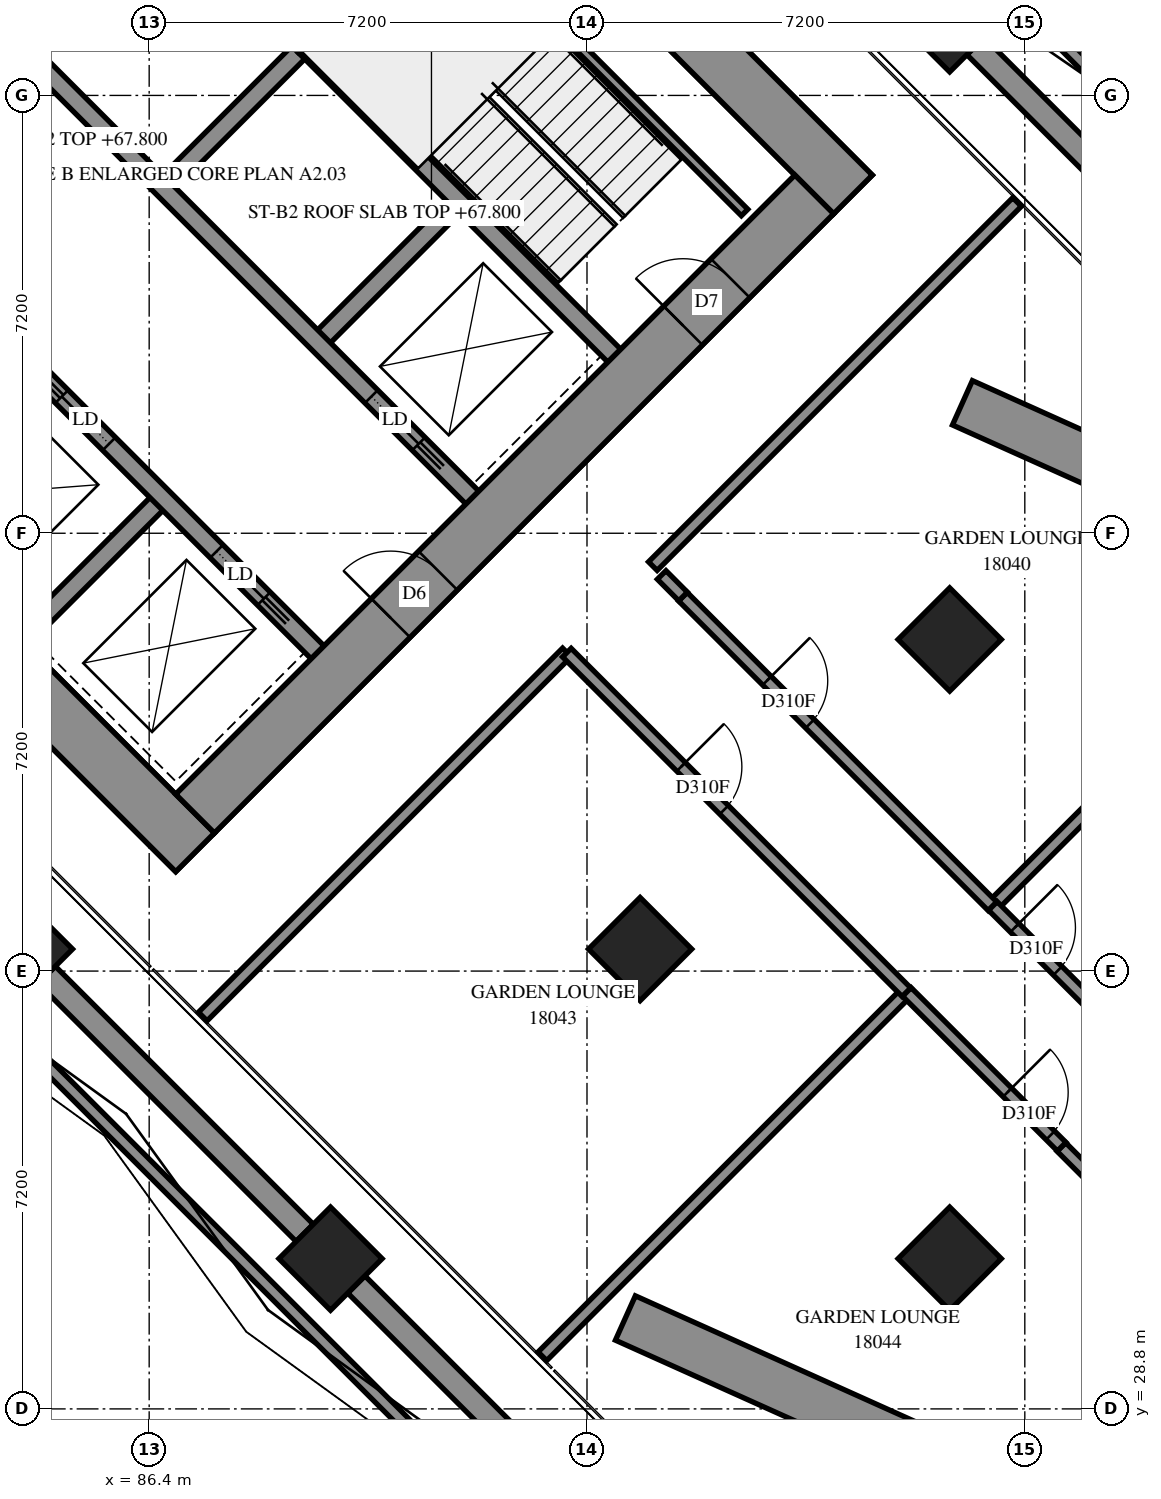
"""IFC4 building model, lengths in metres.
Left out: names, types, materials, properties, quantities, classifications, styles, units other than length and angle.
Written with IfcOpenShell. Run it as: python <this file> out.ifc"""

import sys

from ifc_helpers import new_model, si_unit, direction, frame, frame_2d, origin, origin_2d, place, context, subcontext, project, spatial, polyline, rectangle, outline, extrude, element, fill, save


model = new_model("IFC4")
c1 = context("Model", 3, precision=1e-05, world=origin(), true_north=direction((0.0, 1.0)))
c2 = subcontext(c1, "Body", "Model", "MODEL_VIEW")
j1 = project(units=[si_unit("LENGTHUNIT", "METRE"), si_unit("PLANEANGLEUNIT", "RADIAN")], contexts=[c1])
p1 = place(None, origin())
s1 = spatial("IfcSite", under=j1, at=p1, CompositionType="ELEMENT")
p2 = place(p1, origin())
s2 = spatial("IfcBuilding", under=s1, at=p2, CompositionType="ELEMENT")
p3 = place(p2, frame((0.0, 0.0, 67.8)))
s3 = spatial("IfcBuildingStorey", under=s2, at=p3, CompositionType="ELEMENT", Elevation=67.8)
for number, where, z_axis, x_axis in (
    (1, (99.565, 51.635, 0.0), (0.0, 0.0, 1.0), (0.707, -0.707, 0.0)),
    (2, (84.291, 36.362, 0.0), (0.0, 0.0, 1.0), (0.707, -0.707, 0.0)),
    (3, (99.565, 41.453, 0.0), (0.0, 0.0, 1.0), (0.707, -0.707, 0.0)),
    (4, (94.474, 36.362, 0.0), (0.0, 0.0, 1.0), (0.707, -0.707, 0.0)),
    (5, (89.382, 31.271, 0.0), (0.0, 0.0, 1.0), (0.707, -0.707, 0.0)),
    (6, (99.565, 31.271, 0.0), (0.0, 0.0, 1.0), (0.707, -0.707, 0.0)),
):
    element("IfcColumn", number, at=place(p3, frame(where, z_axis=z_axis, x_axis=x_axis)), inside=s3, PredefinedType="COLUMN", context=c2, shape_type="SweptSolid", body=[
        extrude(rectangle(XDim=1.2, YDim=1.2, at=origin_2d()), origin(), (0.0, 0.0, 1.0), 3.9),
    ])
p4 = place(p3, frame((75.7, 49.408, -0.3), z_axis=(0.0, 0.0, 1.0), x_axis=(0.7071098676, -0.7071036948, 0.0)))
e7 = element("IfcWall", 7, at=p4, inside=s3, PredefinedType="SHEAR", context=c2, shape_type="SweptSolid", body=[
    extrude(rectangle(XDim=16.2, YDim=0.9, at=frame_2d((8.1, 0.0))), origin(), (0.0, 0.0, 1.0), 3.5),
])
p5 = place(p3, frame((86.519, 60.227, -0.3), z_axis=(0.0, 0.0, 1.0), x_axis=(0.7071036948, -0.7071098676, 0.0)))
e8 = element("IfcWall", 8, at=p5, inside=s3, PredefinedType="SHEAR", context=c2, shape_type="SweptSolid", body=[
    extrude(rectangle(XDim=16.2, YDim=0.9, at=frame_2d((8.1, 0.0))), origin(), (0.0, 0.0, 1.0), 3.5),
])
p6 = place(p5, frame((10.9, 0.0, 0.3)))
e9 = element("IfcOpeningElement", 9, at=p6, cuts=e8, PredefinedType="OPENING", context=c2, shape_type="SweptSolid", body=[
    extrude(rectangle(XDim=0.8, YDim=2.1, at=frame_2d((0.4, 1.05))), frame((0.0, 0.46, 0.0), z_axis=(0.0, -1.0, 0.0), x_axis=(1.0, 0.0, 0.0)), (0.0, 0.0, 1.0), 0.92),
])
p7 = place(p3, frame((76.336, 49.408, -0.3), z_axis=(0.0, 0.0, 1.0), x_axis=(0.7071067812, 0.7071067812, 0.0)))
e10 = element("IfcWall", 10, at=p7, inside=s3, PredefinedType="SHEAR", context=c2, shape_type="SweptSolid", body=[
    extrude(rectangle(XDim=14.4, YDim=0.9, at=frame_2d((7.2, 0.0))), origin(), (0.0, 0.0, 1.0), 3.5),
])
p8 = place(p7, frame((4.55, 0.0, 0.3)))
e11 = element("IfcOpeningElement", 11, at=p8, cuts=e10, PredefinedType="OPENING", context=c2, shape_type="SweptSolid", body=[
    extrude(rectangle(XDim=1.1, YDim=2.1, at=frame_2d((0.55, 1.05))), frame((0.0, 0.46, 0.0), z_axis=(0.0, -1.0, 0.0), x_axis=(1.0, 0.0, 0.0)), (0.0, 0.0, 1.0), 0.92),
])
p9 = place(p7, frame((11.35, 0.0, 0.3)))
e12 = element("IfcOpeningElement", 12, at=p9, cuts=e10, PredefinedType="OPENING", context=c2, shape_type="SweptSolid", body=[
    extrude(rectangle(XDim=1.1, YDim=2.1, at=frame_2d((0.55, 1.05))), frame((0.0, 0.46, 0.0), z_axis=(0.0, -1.0, 0.0), x_axis=(1.0, 0.0, 0.0)), (0.0, 0.0, 1.0), 0.92),
])
p10 = place(p3, frame((87.155, 38.589, -0.3), z_axis=(0.0, 0.0, 1.0), x_axis=(0.7071067812, 0.7071067812, 0.0)))
e13 = element("IfcWall", 13, at=p10, inside=s3, PredefinedType="SHEAR", context=c2, shape_type="SweptSolid", body=[
    extrude(rectangle(XDim=14.4, YDim=0.9, at=frame_2d((7.2, 0.0))), origin(), (0.0, 0.0, 1.0), 3.5),
])
p11 = place(p10, frame((4.55, 0.0, 0.3)))
e14 = element("IfcOpeningElement", 14, at=p11, cuts=e13, PredefinedType="OPENING", context=c2, shape_type="SweptSolid", body=[
    extrude(rectangle(XDim=1.1, YDim=2.1, at=frame_2d((0.55, 1.05))), frame((0.0, 0.46, 0.0), z_axis=(0.0, -1.0, 0.0), x_axis=(1.0, 0.0, 0.0)), (0.0, 0.0, 1.0), 0.92),
])
p12 = place(p10, frame((11.35, 0.0, 0.3)))
e15 = element("IfcOpeningElement", 15, at=p12, cuts=e13, PredefinedType="OPENING", context=c2, shape_type="SweptSolid", body=[
    extrude(rectangle(XDim=1.1, YDim=2.1, at=frame_2d((0.55, 1.05))), frame((0.0, 0.46, 0.0), z_axis=(0.0, -1.0, 0.0), x_axis=(1.0, 0.0, 0.0)), (0.0, 0.0, 1.0), 0.92),
])
p13 = place(p3, frame((86.625, 48.878, 0.0), z_axis=(0.0, 0.0, 1.0), x_axis=(0.7071067812, 0.7071067812, 0.0)))
e16 = element("IfcWall", 16, at=p13, inside=s3, PredefinedType="SOLIDWALL", context=c2, shape_type="SweptSolid", body=[
    extrude(rectangle(XDim=3.3, YDim=0.3, at=frame_2d((1.65, 0.0))), origin(), (0.0, 0.0, 1.0), 3.9),
])
p14 = place(p3, frame((84.291, 41.453, 0.0), z_axis=(0.0, 0.0, 1.0), x_axis=(0.7071067812, 0.7071067812, 0.0)))
e17 = element("IfcWall", 17, at=p14, inside=s3, PredefinedType="SOLIDWALL", context=c2, shape_type="SweptSolid", body=[
    extrude(rectangle(XDim=3.3, YDim=0.3, at=frame_2d((1.65, 0.0))), origin(), (0.0, 0.0, 1.0), 3.9),
])
p15 = place(p3, frame((89.17, 46.332, 0.0), z_axis=(0.0, 0.0, 1.0), x_axis=(0.7071067812, 0.7071067812, 0.0)))
e18 = element("IfcWall", 18, at=p15, inside=s3, PredefinedType="SOLIDWALL", context=c2, shape_type="SweptSolid", body=[
    extrude(rectangle(XDim=3.3, YDim=0.3, at=frame_2d((1.65, 0.0))), origin(), (0.0, 0.0, 1.0), 3.9),
])
p16 = place(p3, frame((78.988, 51.423, 0.0), z_axis=(0.0, 0.0, 1.0), x_axis=(0.7071067812, -0.7071067812, 0.0)))
e19 = element("IfcWall", 19, at=p16, inside=s3, PredefinedType="SOLIDWALL", context=c2, shape_type="SweptSolid", body=[
    extrude(rectangle(XDim=14.4, YDim=0.3, at=frame_2d((7.2, 0.0))), origin(), (0.0, 0.0, 1.0), 3.9),
])
p17 = place(p16, frame((1.25, 0.0, 0.0)))
e20 = element("IfcOpeningElement", 20, at=p17, cuts=e19, PredefinedType="OPENING", context=c2, shape_type="SweptSolid", body=[
    extrude(rectangle(XDim=1.1, YDim=2.1, at=frame_2d((0.55, 1.05))), frame((0.0, 0.16, 0.0), z_axis=(0.0, -1.0, 0.0), x_axis=(1.0, 0.0, 0.0)), (0.0, 0.0, 1.0), 0.32),
])
p18 = place(p16, frame((4.85, 0.0, 0.0)))
e21 = element("IfcOpeningElement", 21, at=p18, cuts=e19, PredefinedType="OPENING", context=c2, shape_type="SweptSolid", body=[
    extrude(rectangle(XDim=1.1, YDim=2.1, at=frame_2d((0.55, 1.05))), frame((0.0, 0.16, 0.0), z_axis=(0.0, -1.0, 0.0), x_axis=(1.0, 0.0, 0.0)), (0.0, 0.0, 1.0), 0.32),
])
p19 = place(p16, frame((8.45, 0.0, 0.0)))
e22 = element("IfcOpeningElement", 22, at=p19, cuts=e19, PredefinedType="OPENING", context=c2, shape_type="SweptSolid", body=[
    extrude(rectangle(XDim=1.1, YDim=2.1, at=frame_2d((0.55, 1.05))), frame((0.0, 0.16, 0.0), z_axis=(0.0, -1.0, 0.0), x_axis=(1.0, 0.0, 0.0)), (0.0, 0.0, 1.0), 0.32),
])
p20 = place(p16, frame((12.05, 0.0, 0.0)))
e23 = element("IfcOpeningElement", 23, at=p20, cuts=e19, PredefinedType="OPENING", context=c2, shape_type="SweptSolid", body=[
    extrude(rectangle(XDim=1.1, YDim=2.1, at=frame_2d((0.55, 1.05))), frame((0.0, 0.16, 0.0), z_axis=(0.0, -1.0, 0.0), x_axis=(1.0, 0.0, 0.0)), (0.0, 0.0, 1.0), 0.32),
])
p21 = place(p3, frame((81.534, 53.969, 0.0), z_axis=(0.0, 0.0, 1.0), x_axis=(0.707103309, -0.7071102534, 0.0)))
e24 = element("IfcWall", 24, at=p21, inside=s3, PredefinedType="SOLIDWALL", context=c2, shape_type="SweptSolid", body=[
    extrude(rectangle(XDim=14.4, YDim=0.3, at=frame_2d((7.2, 0.0))), origin(), (0.0, 0.0, 1.0), 3.9),
])
p22 = place(p21, frame((12.05, 0.0, 0.0)))
e25 = element("IfcOpeningElement", 25, at=p22, cuts=e24, PredefinedType="OPENING", context=c2, shape_type="SweptSolid", body=[
    extrude(rectangle(XDim=1.1, YDim=2.1, at=frame_2d((0.55, 1.05))), frame((0.0, 0.16, 0.0), z_axis=(0.0, -1.0, 0.0), x_axis=(1.0, 0.0, 0.0)), (0.0, 0.0, 1.0), 0.32),
])
for number, where, z_axis, x_axis in (
    (26, (83.867, 56.302, 0.0), (0.0, 0.0, 1.0), (0.707, -0.707, 0.0)),
    (27, (88.958, 51.211, 0.0), (0.0, 0.0, 1.0), (0.707, -0.707, 0.0)),
):
    element("IfcWall", number, at=place(p3, frame(where, z_axis=z_axis, x_axis=x_axis)), inside=s3, PredefinedType="SOLIDWALL", context=c2, shape_type="SweptSolid", body=[
        extrude(rectangle(XDim=7.2, YDim=0.3, at=frame_2d((3.6, 0.0))), origin(), (0.0, 0.0, 1.0), 3.9),
    ])
p23 = place(p3, frame((88.958, 51.211, 0.0), z_axis=(0.0, 0.0, 1.0), x_axis=(0.7071067812, 0.7071067812, 0.0)))
e28 = element("IfcWall", 28, at=p23, inside=s3, PredefinedType="SOLIDWALL", context=c2, shape_type="SweptSolid", body=[
    extrude(rectangle(XDim=4.2, YDim=0.3, at=frame_2d((2.1, 0.0))), origin(), (0.0, 0.0, 1.0), 3.9),
])
p24 = place(p3, frame((105.319, 42.853, 0.0), z_axis=(0.0, 0.0, 1.0), x_axis=(-0.9121070138, 0.4099521866, 0.0)))
e29 = element("IfcWall", 29, at=p24, inside=s3, PredefinedType="SOLIDWALL", context=c2, shape_type="SweptSolid", body=[
    extrude(rectangle(XDim=6.079, YDim=0.8, at=frame_2d((3.039, 0.0))), origin(), (0.0, 0.0, 1.0), 0.65),
])
p25 = place(p3, frame((100.242, 27.593, 0.0), z_axis=(0.0, 0.0, 1.0), x_axis=(-0.9121025807, 0.4099620498, 0.0)))
e30 = element("IfcWall", 30, at=p25, inside=s3, PredefinedType="SOLIDWALL", context=c2, shape_type="SweptSolid", body=[
    extrude(rectangle(XDim=6.589, YDim=0.8, at=frame_2d((3.295, 0.0))), origin(), (0.0, 0.0, 1.0), 0.65),
])
p26 = place(p3, frame((112.929, 39.756, 0.0), z_axis=(0.0, 0.0, 1.0), x_axis=(-0.7071067812, 0.7071067812, 0.0)))
e31 = element("IfcWall", 31, at=p26, inside=s3, PredefinedType="SOLIDWALL", context=c2, shape_type="SweptSolid", body=[
    extrude(outline(polyline([(-0.1, -0.1), (47.126, -0.1), (47.044, 0.1), (0.1, 0.1), (-0.1, -0.1)])), origin(), (0.0, 0.0, 1.0), 4.2),
])
p27 = place(p3, frame((77.018, 42.15, 0.0), z_axis=(0.0, 0.0, 1.0), x_axis=(0.7071067812, -0.7071067812, 0.0)))
e32 = element("IfcWall", 32, at=p27, inside=s3, PredefinedType="SOLIDWALL", context=c2, shape_type="SweptSolid", body=[
    extrude(outline(polyline([(0.041, -0.1), (31.986, -0.1), (31.786, 0.1), (-0.041, 0.1), (0.041, -0.1)])), origin(), (0.0, 0.0, 1.0), 4.2),
])
p28 = place(p3, frame((99.565, 19.603, 0.0), z_axis=(0.0, 0.0, 1.0), x_axis=(0.7071067812, 0.7071067812, 0.0)))
e33 = element("IfcWall", 33, at=p28, inside=s3, PredefinedType="SOLIDWALL", context=c2, shape_type="SweptSolid", body=[
    extrude(outline(polyline([(-0.1, -0.1), (19.0, -0.1), (18.8, 0.1), (0.1, 0.1), (-0.1, -0.1)])), origin(), (0.0, 0.0, 1.0), 4.2),
])
p29 = place(p3, frame((91.313, 53.354, 0.0), z_axis=(0.0, 0.0, 1.0), x_axis=(0.7071140275, -0.7070995348, 0.0)))
e34 = element("IfcWall", 34, at=p29, inside=s3, PredefinedType="PARTITIONING", context=c2, shape_type="SweptSolid", body=[
    extrude(rectangle(XDim=6.9, YDim=0.15, at=frame_2d((3.45, 0.0))), origin(), (0.0, 0.0, 1.0), 3.9),
])
for number, where, z_axis, x_axis in (
    (35, (100.271, 37.069, 0.0), (0.0, 0.0, 1.0), (0.707, 0.707, 0.0)),
    (36, (92.867, 29.665, 0.0), (0.0, 0.0, 1.0), (0.707, 0.707, 0.0)),
    (37, (97.958, 24.574, 0.0), (0.0, 0.0, 1.0), (0.707, 0.707, 0.0)),
):
    element("IfcWall", number, at=place(p3, frame(where, z_axis=z_axis, x_axis=x_axis)), inside=s3, PredefinedType="PARTITIONING", context=c2, shape_type="SweptSolid", body=[
        extrude(rectangle(XDim=8.471, YDim=0.2, at=frame_2d((4.236, 0.0))), origin(), (0.0, 0.0, 1.0), 3.9),
    ])
p30 = place(p3, frame((94.683, 42.659, 0.0), z_axis=(0.0, 0.0, 1.0), x_axis=(0.7072248389, 0.7069887037, 0.0)))
e38 = element("IfcWall", 38, at=p30, inside=s3, PredefinedType="PARTITIONING", context=c2, shape_type="SweptSolid", body=[
    extrude(rectangle(XDim=8.47, YDim=0.2, at=frame_2d((4.235, 0.0))), origin(), (0.0, 0.0, 1.0), 3.9),
])
p31 = place(p3, frame((87.281, 35.252, 0.0), z_axis=(0.0, 0.0, 1.0), x_axis=(0.7071067812, 0.7071067812, 0.0)))
e39 = element("IfcWall", 39, at=p31, inside=s3, PredefinedType="PARTITIONING", context=c2, shape_type="SweptSolid", body=[
    extrude(rectangle(XDim=8.468, YDim=0.2, at=frame_2d((4.234, 0.0))), origin(), (0.0, 0.0, 1.0), 3.9),
])
p32 = place(p3, frame((93.269, 41.237, 0.0), z_axis=(0.0, 0.0, 1.0), x_axis=(0.7071067812, -0.7071067812, 0.0)))
e40 = element("IfcWall", 40, at=p32, inside=s3, PredefinedType="PARTITIONING", context=c2, shape_type="SweptSolid", body=[
    extrude(rectangle(XDim=7.9, YDim=0.2, at=frame_2d((3.95, 0.0))), origin(), (0.0, 0.0, 1.0), 3.9),
])
p33 = place(p32, frame((2.656, 0.0, 0.0)))
e41 = element("IfcOpeningElement", 41, at=p33, cuts=e40, PredefinedType="OPENING", context=c2, shape_type="SweptSolid", body=[
    extrude(rectangle(XDim=1.0, YDim=2.1, at=frame_2d((0.5, 1.05))), frame((0.0, 0.11, 0.0), z_axis=(0.0, -1.0, 0.0), x_axis=(1.0, 0.0, 0.0)), (0.0, 0.0, 1.0), 0.22),
])
p34 = place(p3, frame((95.177, 42.157, 0.0), z_axis=(0.0, 0.0, 1.0), x_axis=(0.7071067812, -0.7071067812, 0.0)))
e42 = element("IfcWall", 42, at=p34, inside=s3, PredefinedType="PARTITIONING", context=c2, shape_type="SweptSolid", body=[
    extrude(rectangle(XDim=7.201, YDim=0.2, at=frame_2d((3.601, 0.0))), origin(), (0.0, 0.0, 1.0), 3.9),
])
p35 = place(p34, frame((1.954, 0.0, 0.0)))
e43 = element("IfcOpeningElement", 43, at=p35, cuts=e42, PredefinedType="OPENING", context=c2, shape_type="SweptSolid", body=[
    extrude(rectangle(XDim=1.0, YDim=2.1, at=frame_2d((0.5, 1.05))), frame((0.0, 0.11, 0.0), z_axis=(0.0, -1.0, 0.0), x_axis=(1.0, 0.0, 0.0)), (0.0, 0.0, 1.0), 0.22),
])
p36 = place(p3, frame((105.551, 28.955, 0.0), z_axis=(0.0, 0.0, 1.0), x_axis=(-0.7068512158, 0.7073622542, 0.0)))
e44 = element("IfcWall", 44, at=p36, inside=s3, PredefinedType="PARTITIONING", context=c2, shape_type="SweptSolid", body=[
    extrude(rectangle(XDim=5.87, YDim=0.2, at=frame_2d((2.935, 0.0))), origin(), (0.0, 0.0, 1.0), 3.9),
])
p37 = place(p36, frame((1.168, 0.0, 0.0)))
e45 = element("IfcOpeningElement", 45, at=p37, cuts=e44, PredefinedType="OPENING", context=c2, shape_type="SweptSolid", body=[
    extrude(rectangle(XDim=1.0, YDim=2.1, at=frame_2d((0.5, 1.05))), frame((0.0, 0.11, 0.0), z_axis=(0.0, -1.0, 0.0), x_axis=(1.0, 0.0, 0.0)), (0.0, 0.0, 1.0), 0.22),
])
p38 = place(p3, frame((98.86, 35.656, 0.0), z_axis=(0.0, 0.0, 1.0), x_axis=(0.7073845681, -0.7068288851, 0.0)))
e46 = element("IfcWall", 46, at=p38, inside=s3, PredefinedType="PARTITIONING", context=c2, shape_type="SweptSolid", body=[
    extrude(rectangle(XDim=3.599, YDim=0.2, at=frame_2d((1.8, 0.0))), origin(), (0.0, 0.0, 1.0), 3.9),
])
p39 = place(p38, frame((2.337, 0.0, 0.0)))
e47 = element("IfcOpeningElement", 47, at=p39, cuts=e46, PredefinedType="OPENING", context=c2, shape_type="SweptSolid", body=[
    extrude(rectangle(XDim=1.0, YDim=2.1, at=frame_2d((0.5, 1.05))), frame((0.0, 0.11, 0.0), z_axis=(0.0, -1.0, 0.0), x_axis=(1.0, 0.0, 0.0)), (0.0, 0.0, 1.0), 0.22),
])
p40 = place(p3, frame((100.275, 37.071, 0.0), z_axis=(0.0, 0.0, 1.0), x_axis=(0.7073845681, -0.7068288851, 0.0)))
e48 = element("IfcWall", 48, at=p40, inside=s3, PredefinedType="PARTITIONING", context=c2, shape_type="SweptSolid", body=[
    extrude(rectangle(XDim=3.599, YDim=0.2, at=frame_2d((1.8, 0.0))), origin(), (0.0, 0.0, 1.0), 3.9),
])
p41 = place(p40, frame((0.507, 0.0, 0.0)))
e49 = element("IfcOpeningElement", 49, at=p41, cuts=e48, PredefinedType="OPENING", context=c2, shape_type="SweptSolid", body=[
    extrude(rectangle(XDim=1.0, YDim=2.1, at=frame_2d((0.5, 1.05))), frame((0.0, 0.11, 0.0), z_axis=(0.0, -1.0, 0.0), x_axis=(1.0, 0.0, 0.0)), (0.0, 0.0, 1.0), 0.22),
])
p42 = place(p3, frame((94.828, 42.514, 0.0), z_axis=(0.0, 0.0, 1.0), x_axis=(0.7051008166, -0.7091070712, 0.0)))
e50 = element("IfcWall", 50, at=p42, inside=s3, PredefinedType="PARTITIONING", context=c2, shape_type="SweptSolid", body=[
    extrude(rectangle(XDim=0.499, YDim=0.2, at=frame_2d((0.25, 0.0))), origin(), (0.0, 0.0, 1.0), 3.9),
])
p43 = place(p11, origin())
e51 = element("IfcDoor", 51, at=p43, inside=s3, OperationType="DOUBLE_DOOR_SINGLE_SWING", PredefinedType="DOOR", context=c2, shape_type="SweptSolid", body=[
    extrude(rectangle(XDim=1.1, YDim=2.1, at=frame_2d((0.55, 1.05))), frame((0.0, 0.025, 0.0), z_axis=(0.0, -1.0, 0.0), x_axis=(1.0, 0.0, 0.0)), (0.0, 0.0, 1.0), 0.05),
])
fill(e14, e51)
p44 = place(p12, origin())
e52 = element("IfcDoor", 52, at=p44, inside=s3, OperationType="SINGLE_SWING_RIGHT", PredefinedType="DOOR", context=c2, shape_type="SweptSolid", body=[
    extrude(rectangle(XDim=1.1, YDim=2.1, at=frame_2d((0.55, 1.05))), frame((0.0, 0.025, 0.0), z_axis=(0.0, -1.0, 0.0), x_axis=(1.0, 0.0, 0.0)), (0.0, 0.0, 1.0), 0.05),
])
fill(e15, e52)
p45 = place(p19, origin())
e53 = element("IfcDoor", 53, at=p45, inside=s3, OperationType="SLIDING_TO_LEFT", PredefinedType="DOOR", context=c2, shape_type="SweptSolid", body=[
    extrude(rectangle(XDim=1.1, YDim=2.1, at=frame_2d((0.55, 1.05))), frame((0.0, 0.025, 0.0), z_axis=(0.0, -1.0, 0.0), x_axis=(1.0, 0.0, 0.0)), (0.0, 0.0, 1.0), 0.05),
])
fill(e22, e53)
p46 = place(p20, origin())
e54 = element("IfcDoor", 54, at=p46, inside=s3, OperationType="SLIDING_TO_RIGHT", PredefinedType="DOOR", context=c2, shape_type="SweptSolid", body=[
    extrude(rectangle(XDim=1.1, YDim=2.1, at=frame_2d((0.55, 1.05))), frame((0.0, 0.025, 0.0), z_axis=(0.0, -1.0, 0.0), x_axis=(1.0, 0.0, 0.0)), (0.0, 0.0, 1.0), 0.05),
])
fill(e23, e54)
p47 = place(p22, origin())
e55 = element("IfcDoor", 55, at=p47, inside=s3, OperationType="SLIDING_TO_RIGHT", PredefinedType="DOOR", context=c2, shape_type="SweptSolid", body=[
    extrude(rectangle(XDim=1.1, YDim=2.1, at=frame_2d((0.55, 1.05))), frame((0.0, 0.025, 0.0), z_axis=(0.0, -1.0, 0.0), x_axis=(1.0, 0.0, 0.0)), (0.0, 0.0, 1.0), 0.05),
])
fill(e25, e55)
p48 = place(p35, origin())
e56 = element("IfcDoor", 56, at=p48, inside=s3, OperationType="SINGLE_SWING_RIGHT", PredefinedType="DOOR", context=c2, shape_type="SweptSolid", body=[
    extrude(rectangle(XDim=1.0, YDim=2.1, at=frame_2d((0.5, 1.05))), frame((0.0, 0.025, 0.0), z_axis=(0.0, -1.0, 0.0), x_axis=(1.0, 0.0, 0.0)), (0.0, 0.0, 1.0), 0.05),
])
fill(e43, e56)
p49 = place(p41, origin())
e57 = element("IfcDoor", 57, at=p49, inside=s3, OperationType="SINGLE_SWING_RIGHT", PredefinedType="DOOR", context=c2, shape_type="SweptSolid", body=[
    extrude(rectangle(XDim=1.0, YDim=2.1, at=frame_2d((0.5, 1.05))), frame((0.0, 0.025, 0.0), z_axis=(0.0, -1.0, 0.0), x_axis=(1.0, 0.0, 0.0)), (0.0, 0.0, 1.0), 0.05),
])
fill(e49, e57)
p50 = place(p33, origin())
e58 = element("IfcDoor", 58, at=p50, inside=s3, OperationType="SINGLE_SWING_LEFT", PredefinedType="DOOR", context=c2, shape_type="SweptSolid", body=[
    extrude(rectangle(XDim=1.0, YDim=2.1, at=frame_2d((0.5, 1.05))), frame((0.0, 0.025, 0.0), z_axis=(0.0, -1.0, 0.0), x_axis=(1.0, 0.0, 0.0)), (0.0, 0.0, 1.0), 0.05),
])
fill(e41, e58)
p51 = place(p39, origin())
e59 = element("IfcDoor", 59, at=p51, inside=s3, OperationType="SINGLE_SWING_LEFT", PredefinedType="DOOR", context=c2, shape_type="SweptSolid", body=[
    extrude(rectangle(XDim=1.0, YDim=2.1, at=frame_2d((0.5, 1.05))), frame((0.0, 0.025, 0.0), z_axis=(0.0, -1.0, 0.0), x_axis=(1.0, 0.0, 0.0)), (0.0, 0.0, 1.0), 0.05),
])
fill(e47, e59)
save(model, sys.argv[1])
